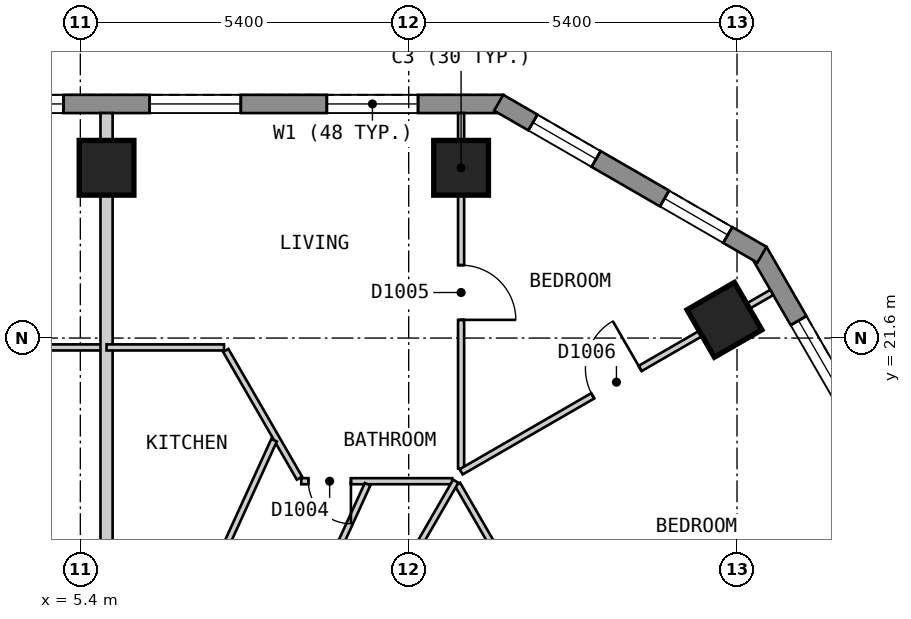
"""IFC4 building model, lengths in metres.
Left out: names, types, materials, properties, quantities, classifications, styles, units other than length and angle.
Written with IfcOpenShell. Run it as: python <this file> out.ifc"""

import sys

from ifc_helpers import new_model, si_unit, direction, frame, frame_2d, origin, origin_2d, place, context, subcontext, project, spatial, polyline, rectangle, outline, extrude, element, fill, save


model = new_model("IFC4")
c1 = context("Model", 3, precision=1e-05, world=origin(), true_north=direction((0.0, 1.0)))
c2 = subcontext(c1, "Body", "Model", "MODEL_VIEW")
j1 = project(units=[si_unit("LENGTHUNIT", "METRE"), si_unit("PLANEANGLEUNIT", "RADIAN")], contexts=[c1])
p1 = place(None, origin())
s1 = spatial("IfcSite", under=j1, at=p1, CompositionType="ELEMENT")
p2 = place(p1, origin())
s2 = spatial("IfcBuilding", under=s1, at=p2, CompositionType="ELEMENT")
p3 = place(p2, frame((0.0, 0.0, 120.6)))
s3 = spatial("IfcBuildingStorey", under=s2, at=p3, CompositionType="ELEMENT", Elevation=120.6)
for number, where, z_axis, x_axis in (
    (1, (11.662, 24.4, 0.0), (0.0, 0.0, 1.0), (-1.0, 0.0, 0.0)),
    (2, (5.831, 24.4, 0.0), (0.0, 0.0, 1.0), (-1.0, 0.0, 0.0)),
    (3, (15.993, 21.9, 0.0), (0.0, 0.0, 1.0), (-0.5, 0.866, 0.0)),
):
    element("IfcColumn", number, at=place(p3, frame(where, z_axis=z_axis, x_axis=x_axis)), inside=s3, PredefinedType="COLUMN", context=c2, shape_type="SweptSolid", body=[
        extrude(rectangle(XDim=0.9, YDim=0.9, at=origin_2d()), origin(), (0.0, 0.0, 1.0), 3.0),
    ])
p4 = place(p3, frame((12.355, 25.45, 0.0), z_axis=(0.0, 0.0, 1.0), x_axis=(-1.0, 0.0, 0.0)))
e4 = element("IfcWall", 4, at=p4, inside=s3, PredefinedType="SOLIDWALL", context=c2, shape_type="SweptSolid", body=[
    extrude(outline(polyline([(0.0, -0.15), (24.71, -0.15), (24.63, 0.15), (0.08, 0.15), (0.0, -0.15)])), origin(), (0.0, 0.0, 1.0), 2.7),
])
p5 = place(p4, frame((1.401, 0.0, 0.15)))
e5 = element("IfcOpeningElement", 5, at=p5, cuts=e4, PredefinedType="OPENING", context=c2, shape_type="SweptSolid", body=[
    extrude(rectangle(XDim=1.5, YDim=2.1, at=frame_2d((0.75, 1.05))), frame((0.0, 0.16, 0.0), z_axis=(0.0, -1.0, 0.0), x_axis=(1.0, 0.0, 0.0)), (0.0, 0.0, 1.0), 0.32),
])
p6 = place(p4, frame((4.316, 0.0, 0.15)))
e6 = element("IfcOpeningElement", 6, at=p6, cuts=e4, PredefinedType="OPENING", context=c2, shape_type="SweptSolid", body=[
    extrude(rectangle(XDim=1.5, YDim=2.1, at=frame_2d((0.75, 1.05))), frame((0.0, 0.16, 0.0), z_axis=(0.0, -1.0, 0.0), x_axis=(1.0, 0.0, 0.0)), (0.0, 0.0, 1.0), 0.32),
])
p7 = place(p4, frame((7.232, 0.0, 0.15)))
e7 = element("IfcOpeningElement", 7, at=p7, cuts=e4, PredefinedType="OPENING", context=c2, shape_type="SweptSolid", body=[
    extrude(rectangle(XDim=1.5, YDim=2.1, at=frame_2d((0.75, 1.05))), frame((0.0, 0.16, 0.0), z_axis=(0.0, -1.0, 0.0), x_axis=(1.0, 0.0, 0.0)), (0.0, 0.0, 1.0), 0.32),
])
p8 = place(p4, frame((10.147, 0.0, 0.15)))
e8 = element("IfcOpeningElement", 8, at=p8, cuts=e4, PredefinedType="OPENING", context=c2, shape_type="SweptSolid", body=[
    extrude(rectangle(XDim=1.5, YDim=2.1, at=frame_2d((0.75, 1.05))), frame((0.0, 0.16, 0.0), z_axis=(0.0, -1.0, 0.0), x_axis=(1.0, 0.0, 0.0)), (0.0, 0.0, 1.0), 0.32),
])
p9 = place(p4, frame((13.063, 0.0, 0.15)))
e9 = element("IfcOpeningElement", 9, at=p9, cuts=e4, PredefinedType="OPENING", context=c2, shape_type="SweptSolid", body=[
    extrude(rectangle(XDim=1.5, YDim=2.1, at=frame_2d((0.75, 1.05))), frame((0.0, 0.16, 0.0), z_axis=(0.0, -1.0, 0.0), x_axis=(1.0, 0.0, 0.0)), (0.0, 0.0, 1.0), 0.32),
])
p10 = place(p4, frame((15.978, 0.0, 0.15)))
e10 = element("IfcOpeningElement", 10, at=p10, cuts=e4, PredefinedType="OPENING", context=c2, shape_type="SweptSolid", body=[
    extrude(rectangle(XDim=1.5, YDim=2.1, at=frame_2d((0.75, 1.05))), frame((0.0, 0.16, 0.0), z_axis=(0.0, -1.0, 0.0), x_axis=(1.0, 0.0, 0.0)), (0.0, 0.0, 1.0), 0.32),
])
p11 = place(p4, frame((18.894, 0.0, 0.15)))
e11 = element("IfcOpeningElement", 11, at=p11, cuts=e4, PredefinedType="OPENING", context=c2, shape_type="SweptSolid", body=[
    extrude(rectangle(XDim=1.5, YDim=2.1, at=frame_2d((0.75, 1.05))), frame((0.0, 0.16, 0.0), z_axis=(0.0, -1.0, 0.0), x_axis=(1.0, 0.0, 0.0)), (0.0, 0.0, 1.0), 0.32),
])
p12 = place(p4, frame((21.809, 0.0, 0.15)))
e12 = element("IfcOpeningElement", 12, at=p12, cuts=e4, PredefinedType="OPENING", context=c2, shape_type="SweptSolid", body=[
    extrude(rectangle(XDim=1.5, YDim=2.1, at=frame_2d((0.75, 1.05))), frame((0.0, 0.16, 0.0), z_axis=(0.0, -1.0, 0.0), x_axis=(1.0, 0.0, 0.0)), (0.0, 0.0, 1.0), 0.32),
])
p13 = place(p3, frame((28.218, 2.825, 0.0), z_axis=(0.0, 0.0, 1.0), x_axis=(-0.500020536353, 0.866013546791, 0.0)))
e13 = element("IfcWall", 13, at=p13, inside=s3, PredefinedType="SOLIDWALL", context=c2, shape_type="SweptSolid", body=[
    extrude(outline(polyline([(0.0, -0.15), (23.325, -0.15), (23.245, 0.15), (0.08, 0.15), (0.0, -0.15)])), origin(), (0.0, 0.0, 1.0), 2.7),
])
p14 = place(p13, frame((1.314, 0.0, 0.15)))
e14 = element("IfcOpeningElement", 14, at=p14, cuts=e13, PredefinedType="OPENING", context=c2, shape_type="SweptSolid", body=[
    extrude(rectangle(XDim=1.5, YDim=2.1, at=frame_2d((0.75, 1.05))), frame((0.0, 0.16, 0.0), z_axis=(0.0, -1.0, 0.0), x_axis=(1.0, 0.0, 0.0)), (0.0, 0.0, 1.0), 0.32),
])
p15 = place(p13, frame((4.056, 0.0, 0.15)))
e15 = element("IfcOpeningElement", 15, at=p15, cuts=e13, PredefinedType="OPENING", context=c2, shape_type="SweptSolid", body=[
    extrude(rectangle(XDim=1.5, YDim=2.1, at=frame_2d((0.75, 1.05))), frame((0.0, 0.16, 0.0), z_axis=(0.0, -1.0, 0.0), x_axis=(1.0, 0.0, 0.0)), (0.0, 0.0, 1.0), 0.32),
])
p16 = place(p13, frame((6.798, 0.0, 0.15)))
e16 = element("IfcOpeningElement", 16, at=p16, cuts=e13, PredefinedType="OPENING", context=c2, shape_type="SweptSolid", body=[
    extrude(rectangle(XDim=1.5, YDim=2.1, at=frame_2d((0.75, 1.05))), frame((0.0, 0.16, 0.0), z_axis=(0.0, -1.0, 0.0), x_axis=(1.0, 0.0, 0.0)), (0.0, 0.0, 1.0), 0.32),
])
p17 = place(p13, frame((9.541, 0.0, 0.15)))
e17 = element("IfcOpeningElement", 17, at=p17, cuts=e13, PredefinedType="OPENING", context=c2, shape_type="SweptSolid", body=[
    extrude(rectangle(XDim=1.5, YDim=2.1, at=frame_2d((0.75, 1.05))), frame((0.0, 0.16, 0.0), z_axis=(0.0, -1.0, 0.0), x_axis=(1.0, 0.0, 0.0)), (0.0, 0.0, 1.0), 0.32),
])
p18 = place(p13, frame((12.284, 0.0, 0.15)))
e18 = element("IfcOpeningElement", 18, at=p18, cuts=e13, PredefinedType="OPENING", context=c2, shape_type="SweptSolid", body=[
    extrude(rectangle(XDim=1.5, YDim=2.1, at=frame_2d((0.75, 1.05))), frame((0.0, 0.16, 0.0), z_axis=(0.0, -1.0, 0.0), x_axis=(1.0, 0.0, 0.0)), (0.0, 0.0, 1.0), 0.32),
])
p19 = place(p13, frame((15.027, 0.0, 0.15)))
e19 = element("IfcOpeningElement", 19, at=p19, cuts=e13, PredefinedType="OPENING", context=c2, shape_type="SweptSolid", body=[
    extrude(rectangle(XDim=1.5, YDim=2.1, at=frame_2d((0.75, 1.05))), frame((0.0, 0.16, 0.0), z_axis=(0.0, -1.0, 0.0), x_axis=(1.0, 0.0, 0.0)), (0.0, 0.0, 1.0), 0.32),
])
p20 = place(p13, frame((17.769, 0.0, 0.15)))
e20 = element("IfcOpeningElement", 20, at=p20, cuts=e13, PredefinedType="OPENING", context=c2, shape_type="SweptSolid", body=[
    extrude(rectangle(XDim=1.5, YDim=2.1, at=frame_2d((0.75, 1.05))), frame((0.0, 0.16, 0.0), z_axis=(0.0, -1.0, 0.0), x_axis=(1.0, 0.0, 0.0)), (0.0, 0.0, 1.0), 0.32),
])
p21 = place(p13, frame((20.511, 0.0, 0.15)))
e21 = element("IfcOpeningElement", 21, at=p21, cuts=e13, PredefinedType="OPENING", context=c2, shape_type="SweptSolid", body=[
    extrude(rectangle(XDim=1.5, YDim=2.1, at=frame_2d((0.75, 1.05))), frame((0.0, 0.16, 0.0), z_axis=(0.0, -1.0, 0.0), x_axis=(1.0, 0.0, 0.0)), (0.0, 0.0, 1.0), 0.32),
])
p22 = place(p3, frame((16.61, 22.97, 0.0), z_axis=(0.0, 0.0, 1.0), x_axis=(-0.866022959057, 0.500004234368, 0.0)))
e22 = element("IfcWall", 22, at=p22, inside=s3, PredefinedType="SOLIDWALL", context=c2, shape_type="SweptSolid", body=[
    extrude(outline(polyline([(0.0, -0.15), (5.0, -0.15), (4.92, 0.15), (0.08, 0.15), (0.0, -0.15)])), origin(), (0.0, 0.0, 1.0), 2.7),
])
p23 = place(p22, frame((0.65, 0.0, 0.15)))
e23 = element("IfcOpeningElement", 23, at=p23, cuts=e22, PredefinedType="OPENING", context=c2, shape_type="SweptSolid", body=[
    extrude(rectangle(XDim=1.2, YDim=2.1, at=frame_2d((0.6, 1.05))), frame((0.0, 0.16, 0.0), z_axis=(0.0, -1.0, 0.0), x_axis=(1.0, 0.0, 0.0)), (0.0, 0.0, 1.0), 0.32),
])
p24 = place(p22, frame((3.15, 0.0, 0.15)))
e24 = element("IfcOpeningElement", 24, at=p24, cuts=e22, PredefinedType="OPENING", context=c2, shape_type="SweptSolid", body=[
    extrude(rectangle(XDim=1.2, YDim=2.1, at=frame_2d((0.6, 1.05))), frame((0.0, 0.16, 0.0), z_axis=(0.0, -1.0, 0.0), x_axis=(1.0, 0.0, 0.0)), (0.0, 0.0, 1.0), 0.32),
])
p25 = place(p3, frame((7.792, 21.396, 0.0), z_axis=(0.0, 0.0, 1.0), x_axis=(0.499821239653, -0.866128586522, 0.0)))
e25 = element("IfcWall", 25, at=p25, inside=s3, PredefinedType="PARTITIONING", context=c2, shape_type="SweptSolid", body=[
    extrude(rectangle(XDim=2.425, YDim=0.1, at=frame_2d((1.212, 0.0))), origin(), (0.0, 0.0, 1.0), 2.7),
])
p26 = place(p3, frame((11.603, 19.196, 0.0), z_axis=(0.0, 0.0, 1.0), x_axis=(0.499913406181, -0.866075392977, 0.0)))
e26 = element("IfcWall", 26, at=p26, inside=s3, PredefinedType="PARTITIONING", context=c2, shape_type="SweptSolid", body=[
    extrude(rectangle(XDim=5.239, YDim=0.1, at=frame_2d((2.619, 0.0))), origin(), (0.0, 0.0, 1.0), 2.7),
])
p27 = place(p26, frame((2.24, 0.0, 0.0)))
e27 = element("IfcOpeningElement", 27, at=p27, cuts=e26, PredefinedType="OPENING", context=c2, shape_type="SweptSolid", body=[
    extrude(rectangle(XDim=0.8, YDim=2.1, at=frame_2d((0.4, 1.05))), frame((0.0, 0.06, 0.0), z_axis=(0.0, -1.0, 0.0), x_axis=(1.0, 0.0, 0.0)), (0.0, 0.0, 1.0), 0.12),
])
p28 = place(p3, frame((9.033, 19.246, 0.0), z_axis=(0.0, 0.0, 1.0), x_axis=(1.0, 0.0, 0.0)))
e28 = element("IfcWall", 28, at=p28, inside=s3, PredefinedType="PARTITIONING", context=c2, shape_type="SweptSolid", body=[
    extrude(rectangle(XDim=2.483, YDim=0.1, at=frame_2d((1.242, 0.0))), origin(), (0.0, 0.0, 1.0), 2.7),
])
p29 = place(p28, frame((0.117, 0.0, 0.0)))
e29 = element("IfcOpeningElement", 29, at=p29, cuts=e28, PredefinedType="OPENING", context=c2, shape_type="SweptSolid", body=[
    extrude(rectangle(XDim=0.7, YDim=2.1, at=frame_2d((0.35, 1.05))), frame((0.0, 0.06, 0.0), z_axis=(0.0, -1.0, 0.0), x_axis=(1.0, 0.0, 0.0)), (0.0, 0.0, 1.0), 0.12),
])
p30 = place(p3, frame((-7.706, 21.446, 0.0), z_axis=(0.0, 0.0, 1.0), x_axis=(1.0, 0.0, 0.0)))
e30 = element("IfcWall", 30, at=p30, inside=s3, PredefinedType="PARTITIONING", context=c2, shape_type="SweptSolid", body=[
    extrude(rectangle(XDim=13.537, YDim=0.1, at=frame_2d((6.769, 0.0))), origin(), (0.0, 0.0, 1.0), 2.7),
])
p31 = place(p30, frame((4.35, 0.0, 0.0)))
e31 = element("IfcOpeningElement", 31, at=p31, cuts=e30, PredefinedType="OPENING", context=c2, shape_type="SweptSolid", body=[
    extrude(rectangle(XDim=0.9, YDim=2.1, at=frame_2d((0.45, 1.05))), frame((0.0, 0.06, 0.0), z_axis=(0.0, -1.0, 0.0), x_axis=(1.0, 0.0, 0.0)), (0.0, 0.0, 1.0), 0.12),
])
p32 = place(p3, frame((9.238, 15.2, 0.0), z_axis=(0.0, 0.0, 1.0), x_axis=(0.499983303743, 0.866035043158, 0.0)))
e32 = element("IfcWall", 32, at=p32, inside=s3, PredefinedType="PARTITIONING", context=c2, shape_type="SweptSolid", body=[
    extrude(rectangle(XDim=4.672, YDim=0.1, at=frame_2d((2.336, 0.0))), origin(), (0.0, 0.0, 1.0), 2.7),
])
p33 = place(p3, frame((8.346, 15.3, 0.0), z_axis=(0.0, 0.0, 1.0), x_axis=(0.415189790387, 0.909734817383, 0.0)))
e33 = element("IfcWall", 33, at=p33, inside=s3, PredefinedType="PARTITIONING", context=c2, shape_type="SweptSolid", body=[
    extrude(rectangle(XDim=4.282, YDim=0.1, at=frame_2d((2.141, 0.0))), origin(), (0.0, 0.0, 1.0), 2.7),
])
p34 = place(p33, frame((1.714, 0.0, 0.0)))
e34 = element("IfcOpeningElement", 34, at=p34, cuts=e33, PredefinedType="OPENING", context=c2, shape_type="SweptSolid", body=[
    extrude(rectangle(XDim=0.8, YDim=2.1, at=frame_2d((0.4, 1.05))), frame((0.0, 0.06, 0.0), z_axis=(0.0, -1.0, 0.0), x_axis=(1.0, 0.0, 0.0)), (0.0, 0.0, 1.0), 0.12),
])
p35 = place(p3, frame((6.6, 15.569, 0.0), z_axis=(0.0, 0.0, 1.0), x_axis=(0.415221636251, 0.909720282718, 0.0)))
e35 = element("IfcWall", 35, at=p35, inside=s3, PredefinedType="PARTITIONING", context=c2, shape_type="SweptSolid", body=[
    extrude(rectangle(XDim=4.783, YDim=0.1, at=frame_2d((2.391, 0.0))), origin(), (0.0, 0.0, 1.0), 2.7),
])
p36 = place(p35, frame((1.911, 0.0, 0.0)))
e36 = element("IfcOpeningElement", 36, at=p36, cuts=e35, PredefinedType="OPENING", context=c2, shape_type="SweptSolid", body=[
    extrude(rectangle(XDim=0.9, YDim=2.1, at=frame_2d((0.45, 1.05))), frame((0.0, 0.06, 0.0), z_axis=(0.0, -1.0, 0.0), x_axis=(1.0, 0.0, 0.0)), (0.0, 0.0, 1.0), 0.12),
])
p37 = place(p3, frame((11.662, 19.456, 0.0), z_axis=(0.0, 0.0, 1.0), x_axis=(0.0, 1.0, 0.0)))
e37 = element("IfcWall", 37, at=p37, inside=s3, PredefinedType="PARTITIONING", context=c2, shape_type="SweptSolid", body=[
    extrude(rectangle(XDim=5.844, YDim=0.1, at=frame_2d((2.922, 0.0))), origin(), (0.0, 0.0, 1.0), 2.7),
])
p38 = place(p37, frame((2.443, 0.0, 0.0)))
e38 = element("IfcOpeningElement", 38, at=p38, cuts=e37, PredefinedType="OPENING", context=c2, shape_type="SweptSolid", body=[
    extrude(rectangle(XDim=0.9, YDim=2.1, at=frame_2d((0.45, 1.05))), frame((0.0, 0.06, 0.0), z_axis=(0.0, -1.0, 0.0), x_axis=(1.0, 0.0, 0.0)), (0.0, 0.0, 1.0), 0.12),
])
p39 = place(p3, frame((11.663, 19.4, 0.0), z_axis=(0.0, 0.0, 1.0), x_axis=(0.865941558533, 0.500145196124, 0.0)))
e39 = element("IfcWall", 39, at=p39, inside=s3, PredefinedType="PARTITIONING", context=c2, shape_type="SweptSolid", body=[
    extrude(rectangle(XDim=5.899, YDim=0.1, at=frame_2d((2.949, 0.0))), origin(), (0.0, 0.0, 1.0), 2.7),
])
p40 = place(p39, frame((2.499, 0.0, 0.0)))
e40 = element("IfcOpeningElement", 40, at=p40, cuts=e39, PredefinedType="OPENING", context=c2, shape_type="SweptSolid", body=[
    extrude(rectangle(XDim=0.9, YDim=2.1, at=frame_2d((0.45, 1.05))), frame((0.0, 0.06, 0.0), z_axis=(0.0, -1.0, 0.0), x_axis=(1.0, 0.0, 0.0)), (0.0, 0.0, 1.0), 0.12),
])
p41 = place(p3, frame((5.831, 16.9, 0.0), z_axis=(0.0, 0.0, 1.0), x_axis=(0.0, 1.0, 0.0)))
e41 = element("IfcWall", 41, at=p41, inside=s3, PredefinedType="PARTITIONING", context=c2, shape_type="SweptSolid", body=[
    extrude(rectangle(XDim=8.4, YDim=0.2, at=frame_2d((4.2, 0.0))), origin(), (0.0, 0.0, 1.0), 2.7),
])
p42 = place(p3, frame((5.831, 21.446, 0.0), z_axis=(0.0, 0.0, 1.0), x_axis=(1.0, 0.0, 0.0)))
e42 = element("IfcWall", 42, at=p42, inside=s3, PredefinedType="PARTITIONING", context=c2, shape_type="SweptSolid", body=[
    extrude(rectangle(XDim=1.932, YDim=0.1, at=frame_2d((0.966, 0.0))), origin(), (0.0, 0.0, 1.0), 2.7),
])
p43 = place(p5, origin())
e43 = element("IfcWindow", 43, at=p43, inside=s3, PartitioningType="SINGLE_PANEL", PredefinedType="WINDOW", context=c2, shape_type="SweptSolid", body=[
    extrude(rectangle(XDim=1.5, YDim=2.1, at=frame_2d((0.75, 1.05))), frame((0.0, 0.03, 0.0), z_axis=(0.0, -1.0, 0.0), x_axis=(1.0, 0.0, 0.0)), (0.0, 0.0, 1.0), 0.06),
])
fill(e5, e43)
p44 = place(p6, origin())
e44 = element("IfcWindow", 44, at=p44, inside=s3, PartitioningType="SINGLE_PANEL", PredefinedType="WINDOW", context=c2, shape_type="SweptSolid", body=[
    extrude(rectangle(XDim=1.5, YDim=2.1, at=frame_2d((0.75, 1.05))), frame((0.0, 0.03, 0.0), z_axis=(0.0, -1.0, 0.0), x_axis=(1.0, 0.0, 0.0)), (0.0, 0.0, 1.0), 0.06),
])
fill(e6, e44)
p45 = place(p7, origin())
e45 = element("IfcWindow", 45, at=p45, inside=s3, PartitioningType="SINGLE_PANEL", PredefinedType="WINDOW", context=c2, shape_type="SweptSolid", body=[
    extrude(rectangle(XDim=1.5, YDim=2.1, at=frame_2d((0.75, 1.05))), frame((0.0, 0.03, 0.0), z_axis=(0.0, -1.0, 0.0), x_axis=(1.0, 0.0, 0.0)), (0.0, 0.0, 1.0), 0.06),
])
fill(e7, e45)
p46 = place(p21, origin())
e46 = element("IfcWindow", 46, at=p46, inside=s3, PartitioningType="SINGLE_PANEL", PredefinedType="WINDOW", context=c2, shape_type="SweptSolid", body=[
    extrude(rectangle(XDim=1.5, YDim=2.1, at=frame_2d((0.75, 1.05))), frame((0.0, 0.03, 0.0), z_axis=(0.0, -1.0, 0.0), x_axis=(1.0, 0.0, 0.0)), (0.0, 0.0, 1.0), 0.06),
])
fill(e21, e46)
p47 = place(p23, origin())
e47 = element("IfcWindow", 47, at=p47, inside=s3, PartitioningType="SINGLE_PANEL", PredefinedType="WINDOW", context=c2, shape_type="SweptSolid", body=[
    extrude(rectangle(XDim=1.2, YDim=2.1, at=frame_2d((0.6, 1.05))), frame((0.0, 0.03, 0.0), z_axis=(0.0, -1.0, 0.0), x_axis=(1.0, 0.0, 0.0)), (0.0, 0.0, 1.0), 0.06),
])
fill(e23, e47)
p48 = place(p24, origin())
e48 = element("IfcWindow", 48, at=p48, inside=s3, PartitioningType="SINGLE_PANEL", PredefinedType="WINDOW", context=c2, shape_type="SweptSolid", body=[
    extrude(rectangle(XDim=1.2, YDim=2.1, at=frame_2d((0.6, 1.05))), frame((0.0, 0.03, 0.0), z_axis=(0.0, -1.0, 0.0), x_axis=(1.0, 0.0, 0.0)), (0.0, 0.0, 1.0), 0.06),
])
fill(e24, e48)
p49 = place(p29, origin())
e49 = element("IfcDoor", 49, at=p49, inside=s3, OperationType="SINGLE_SWING_RIGHT", PredefinedType="DOOR", context=c2, shape_type="SweptSolid", body=[
    extrude(rectangle(XDim=0.7, YDim=2.1, at=frame_2d((0.35, 1.05))), frame((0.0, 0.025, 0.0), z_axis=(0.0, -1.0, 0.0), x_axis=(1.0, 0.0, 0.0)), (0.0, 0.0, 1.0), 0.05),
])
fill(e29, e49)
p50 = place(p38, origin())
e50 = element("IfcDoor", 50, at=p50, inside=s3, OperationType="SINGLE_SWING_LEFT", PredefinedType="DOOR", context=c2, shape_type="SweptSolid", body=[
    extrude(rectangle(XDim=0.9, YDim=2.1, at=frame_2d((0.45, 1.05))), frame((0.0, 0.025, 0.0), z_axis=(0.0, -1.0, 0.0), x_axis=(1.0, 0.0, 0.0)), (0.0, 0.0, 1.0), 0.05),
])
fill(e38, e50)
p51 = place(p40, origin())
e51 = element("IfcDoor", 51, at=p51, inside=s3, OperationType="SINGLE_SWING_RIGHT", PredefinedType="DOOR", context=c2, shape_type="SweptSolid", body=[
    extrude(rectangle(XDim=0.9, YDim=2.1, at=frame_2d((0.45, 1.05))), frame((0.0, 0.025, 0.0), z_axis=(0.0, -1.0, 0.0), x_axis=(1.0, 0.0, 0.0)), (0.0, 0.0, 1.0), 0.05),
])
fill(e40, e51)
save(model, sys.argv[1])
